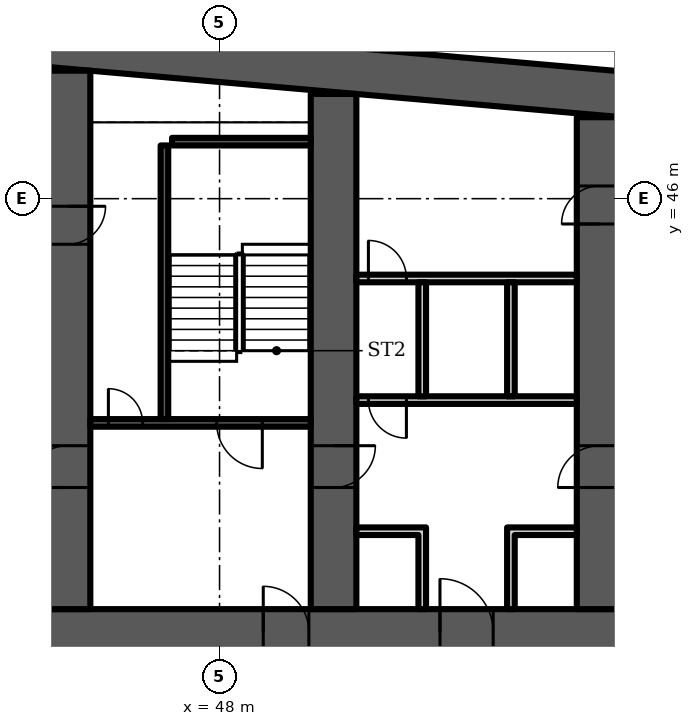
"""IFC4 building model, lengths in metres.
Left out: names, types, materials, properties, quantities, classifications, styles, units other than length and angle.
Written with IfcOpenShell. Run it as: python <this file> out.ifc"""

import sys

from ifc_helpers import new_model, si_unit, direction, frame, frame_2d, origin, place, context, subcontext, project, spatial, polyline, rectangle, outline, extrude, element, fill, save


model = new_model("IFC4")
c1 = context("Model", 3, precision=1e-05, world=origin(), true_north=direction((0.0, 1.0)))
c2 = subcontext(c1, "Body", "Model", "MODEL_VIEW")
j1 = project(units=[si_unit("LENGTHUNIT", "METRE"), si_unit("PLANEANGLEUNIT", "RADIAN")], contexts=[c1])
p1 = place(None, origin())
s1 = spatial("IfcSite", under=j1, at=p1, CompositionType="ELEMENT")
p2 = place(p1, origin())
s2 = spatial("IfcBuilding", under=s1, at=p2, CompositionType="ELEMENT")
p3 = place(p2, frame((0.0, 0.0, 73.9)))
s3 = spatial("IfcBuildingStorey", under=s2, at=p3, CompositionType="ELEMENT", Elevation=73.9)
p4 = place(p3, origin())
e1 = element("IfcWall", 1, at=p4, inside=s3, PredefinedType="SHEAR", context=c2, shape_type="SweptSolid", body=[
    extrude(outline(polyline([(9.0, 47.583), (37.0, 50.032), (65.0, 47.583), (65.0, 48.787), (37.0, 51.237), (9.0, 48.787), (9.0, 47.583)])), origin(), (0.0, 0.0, 1.0), 3.6),
])
p5 = place(p3, frame((9.0, 34.6, 0.0), z_axis=(0.0, 0.0, 1.0), x_axis=(1.0, 0.0, 0.0)))
e2 = element("IfcWall", 2, at=p5, inside=s3, PredefinedType="SHEAR", context=c2, shape_type="SweptSolid", body=[
    extrude(rectangle(XDim=56.0, YDim=1.2, at=frame_2d((28.0, 0.0))), origin(), (0.0, 0.0, 1.0), 3.6),
])
p6 = place(p5, frame((2.0, 0.0, 0.0)))
e3 = element("IfcOpeningElement", 3, at=p6, cuts=e2, PredefinedType="OPENING", context=c2, shape_type="SweptSolid", body=[
    extrude(rectangle(XDim=1.0, YDim=2.1, at=frame_2d((0.5, 1.05))), frame((0.0, 0.61, 0.0), z_axis=(0.0, -1.0, 0.0), x_axis=(1.0, 0.0, 0.0)), (0.0, 0.0, 1.0), 1.22),
])
p7 = place(p5, frame((4.6, 0.0, 0.0)))
e4 = element("IfcOpeningElement", 4, at=p7, cuts=e2, PredefinedType="OPENING", context=c2, shape_type="SweptSolid", body=[
    extrude(rectangle(XDim=1.0, YDim=2.1, at=frame_2d((0.5, 1.05))), frame((0.0, 0.61, 0.0), z_axis=(0.0, -1.0, 0.0), x_axis=(1.0, 0.0, 0.0)), (0.0, 0.0, 1.0), 1.22),
])
p8 = place(p5, frame((7.867, 0.0, 0.0)))
e5 = element("IfcOpeningElement", 5, at=p8, cuts=e2, PredefinedType="OPENING", context=c2, shape_type="SweptSolid", body=[
    extrude(rectangle(XDim=1.1, YDim=2.1, at=frame_2d((0.55, 1.05))), frame((0.0, 0.61, 0.0), z_axis=(0.0, -1.0, 0.0), x_axis=(1.0, 0.0, 0.0)), (0.0, 0.0, 1.0), 1.22),
])
p9 = place(p5, frame((12.033, 0.0, 0.0)))
e6 = element("IfcOpeningElement", 6, at=p9, cuts=e2, PredefinedType="OPENING", context=c2, shape_type="SweptSolid", body=[
    extrude(rectangle(XDim=1.1, YDim=2.1, at=frame_2d((0.55, 1.05))), frame((0.0, 0.61, 0.0), z_axis=(0.0, -1.0, 0.0), x_axis=(1.0, 0.0, 0.0)), (0.0, 0.0, 1.0), 1.22),
])
p10 = place(p5, frame((9.8, 0.0, 0.0)))
e7 = element("IfcOpeningElement", 7, at=p10, cuts=e2, PredefinedType="OPENING", context=c2, shape_type="SweptSolid", body=[
    extrude(rectangle(XDim=1.4, YDim=2.1, at=frame_2d((0.7, 1.05))), frame((0.0, 0.61, 0.0), z_axis=(0.0, -1.0, 0.0), x_axis=(1.0, 0.0, 0.0)), (0.0, 0.0, 1.0), 1.22),
])
p11 = place(p5, frame((14.65, 0.0, 0.0)))
e8 = element("IfcOpeningElement", 8, at=p11, cuts=e2, PredefinedType="OPENING", context=c2, shape_type="SweptSolid", body=[
    extrude(rectangle(XDim=1.2, YDim=2.1, at=frame_2d((0.6, 1.05))), frame((0.0, 0.61, 0.0), z_axis=(0.0, -1.0, 0.0), x_axis=(1.0, 0.0, 0.0)), (0.0, 0.0, 1.0), 1.22),
])
p12 = place(p5, frame((21.867, 0.0, 0.0)))
e9 = element("IfcOpeningElement", 9, at=p12, cuts=e2, PredefinedType="OPENING", context=c2, shape_type="SweptSolid", body=[
    extrude(rectangle(XDim=1.1, YDim=2.1, at=frame_2d((0.55, 1.05))), frame((0.0, 0.61, 0.0), z_axis=(0.0, -1.0, 0.0), x_axis=(1.0, 0.0, 0.0)), (0.0, 0.0, 1.0), 1.22),
])
p13 = place(p5, frame((26.033, 0.0, 0.0)))
e10 = element("IfcOpeningElement", 10, at=p13, cuts=e2, PredefinedType="OPENING", context=c2, shape_type="SweptSolid", body=[
    extrude(rectangle(XDim=1.1, YDim=2.1, at=frame_2d((0.55, 1.05))), frame((0.0, 0.61, 0.0), z_axis=(0.0, -1.0, 0.0), x_axis=(1.0, 0.0, 0.0)), (0.0, 0.0, 1.0), 1.22),
])
p14 = place(p5, frame((23.8, 0.0, 0.0)))
e11 = element("IfcOpeningElement", 11, at=p14, cuts=e2, PredefinedType="OPENING", context=c2, shape_type="SweptSolid", body=[
    extrude(rectangle(XDim=1.4, YDim=2.1, at=frame_2d((0.7, 1.05))), frame((0.0, 0.61, 0.0), z_axis=(0.0, -1.0, 0.0), x_axis=(1.0, 0.0, 0.0)), (0.0, 0.0, 1.0), 1.22),
])
p15 = place(p5, frame((28.867, 0.0, 0.0)))
e12 = element("IfcOpeningElement", 12, at=p15, cuts=e2, PredefinedType="OPENING", context=c2, shape_type="SweptSolid", body=[
    extrude(rectangle(XDim=1.1, YDim=2.1, at=frame_2d((0.55, 1.05))), frame((0.0, 0.61, 0.0), z_axis=(0.0, -1.0, 0.0), x_axis=(1.0, 0.0, 0.0)), (0.0, 0.0, 1.0), 1.22),
])
p16 = place(p5, frame((33.033, 0.0, 0.0)))
e13 = element("IfcOpeningElement", 13, at=p16, cuts=e2, PredefinedType="OPENING", context=c2, shape_type="SweptSolid", body=[
    extrude(rectangle(XDim=1.1, YDim=2.1, at=frame_2d((0.55, 1.05))), frame((0.0, 0.61, 0.0), z_axis=(0.0, -1.0, 0.0), x_axis=(1.0, 0.0, 0.0)), (0.0, 0.0, 1.0), 1.22),
])
p17 = place(p5, frame((40.15, 0.0, 0.0)))
e14 = element("IfcOpeningElement", 14, at=p17, cuts=e2, PredefinedType="OPENING", context=c2, shape_type="SweptSolid", body=[
    extrude(rectangle(XDim=1.2, YDim=2.1, at=frame_2d((0.6, 1.05))), frame((0.0, 0.61, 0.0), z_axis=(0.0, -1.0, 0.0), x_axis=(1.0, 0.0, 0.0)), (0.0, 0.0, 1.0), 1.22),
])
p18 = place(p5, frame((44.8, 0.0, 0.0)))
e15 = element("IfcOpeningElement", 15, at=p18, cuts=e2, PredefinedType="OPENING", context=c2, shape_type="SweptSolid", body=[
    extrude(rectangle(XDim=1.4, YDim=2.1, at=frame_2d((0.7, 1.05))), frame((0.0, 0.61, 0.0), z_axis=(0.0, -1.0, 0.0), x_axis=(1.0, 0.0, 0.0)), (0.0, 0.0, 1.0), 1.22),
])
p19 = place(p5, frame((49.867, 0.0, 0.0)))
e16 = element("IfcOpeningElement", 16, at=p19, cuts=e2, PredefinedType="OPENING", context=c2, shape_type="SweptSolid", body=[
    extrude(rectangle(XDim=1.1, YDim=2.1, at=frame_2d((0.55, 1.05))), frame((0.0, 0.61, 0.0), z_axis=(0.0, -1.0, 0.0), x_axis=(1.0, 0.0, 0.0)), (0.0, 0.0, 1.0), 1.22),
])
p20 = place(p5, frame((53.5, 0.0, 0.0)))
e17 = element("IfcOpeningElement", 17, at=p20, cuts=e2, PredefinedType="OPENING", context=c2, shape_type="SweptSolid", body=[
    extrude(rectangle(XDim=1.1, YDim=2.1, at=frame_2d((0.55, 1.05))), frame((0.0, 0.61, 0.0), z_axis=(0.0, -1.0, 0.0), x_axis=(1.0, 0.0, 0.0)), (0.0, 0.0, 1.0), 1.22),
])
p21 = place(p5, frame((51.567, 0.0, 0.0)))
e18 = element("IfcOpeningElement", 18, at=p21, cuts=e2, PredefinedType="OPENING", context=c2, shape_type="SweptSolid", body=[
    extrude(rectangle(XDim=1.4, YDim=2.1, at=frame_2d((0.7, 1.05))), frame((0.0, 0.61, 0.0), z_axis=(0.0, -1.0, 0.0), x_axis=(1.0, 0.0, 0.0)), (0.0, 0.0, 1.0), 1.22),
])
p22 = place(p3, frame((44.0, 35.2, 0.0), z_axis=(0.0, 0.0, 1.0), x_axis=(0.0, 1.0, 0.0)))
e19 = element("IfcWall", 19, at=p22, inside=s3, PredefinedType="SHEAR", context=c2, shape_type="SweptSolid", body=[
    extrude(rectangle(XDim=14.168, YDim=1.2, at=frame_2d((7.084, 0.0))), origin(), (0.0, 0.0, 1.0), 3.6),
])
p23 = place(p22, frame((3.2, 0.0, 0.0)))
e20 = element("IfcOpeningElement", 20, at=p23, cuts=e19, PredefinedType="OPENING", context=c2, shape_type="SweptSolid", body=[
    extrude(rectangle(XDim=1.1, YDim=2.1, at=frame_2d((0.55, 1.05))), frame((0.0, 0.61, 0.0), z_axis=(0.0, -1.0, 0.0), x_axis=(1.0, 0.0, 0.0)), (0.0, 0.0, 1.0), 1.22),
])
p24 = place(p22, frame((9.6, 0.0, 0.0)))
e21 = element("IfcOpeningElement", 21, at=p24, cuts=e19, PredefinedType="OPENING", context=c2, shape_type="SweptSolid", body=[
    extrude(rectangle(XDim=1.0, YDim=2.1, at=frame_2d((0.5, 1.05))), frame((0.0, 0.61, 0.0), z_axis=(0.0, -1.0, 0.0), x_axis=(1.0, 0.0, 0.0)), (0.0, 0.0, 1.0), 1.22),
])
p25 = place(p3, frame((51.0, 35.2, 0.0), z_axis=(0.0, 0.0, 1.0), x_axis=(0.0, 1.0, 0.0)))
e22 = element("IfcWall", 22, at=p25, inside=s3, PredefinedType="SHEAR", context=c2, shape_type="SweptSolid", body=[
    extrude(rectangle(XDim=13.555, YDim=1.2, at=frame_2d((6.778, 0.0))), origin(), (0.0, 0.0, 1.0), 3.6),
])
p26 = place(p25, frame((3.2, 0.0, 0.0)))
e23 = element("IfcOpeningElement", 23, at=p26, cuts=e22, PredefinedType="OPENING", context=c2, shape_type="SweptSolid", body=[
    extrude(rectangle(XDim=1.1, YDim=2.1, at=frame_2d((0.55, 1.05))), frame((0.0, 0.61, 0.0), z_axis=(0.0, -1.0, 0.0), x_axis=(1.0, 0.0, 0.0)), (0.0, 0.0, 1.0), 1.22),
])
p27 = place(p3, frame((58.0, 35.2, 0.0), z_axis=(0.0, 0.0, 1.0), x_axis=(0.0, 1.0, 0.0)))
e24 = element("IfcWall", 24, at=p27, inside=s3, PredefinedType="SHEAR", context=c2, shape_type="SweptSolid", body=[
    extrude(rectangle(XDim=12.943, YDim=1.2, at=frame_2d((6.471, 0.0))), origin(), (0.0, 0.0, 1.0), 3.6),
])
p28 = place(p27, frame((10.134, 0.0, 0.0)))
e25 = element("IfcOpeningElement", 25, at=p28, cuts=e24, PredefinedType="OPENING", context=c2, shape_type="SweptSolid", body=[
    extrude(rectangle(XDim=1.0, YDim=2.1, at=frame_2d((0.5, 1.05))), frame((0.0, 0.61, 0.0), z_axis=(0.0, -1.0, 0.0), x_axis=(1.0, 0.0, 0.0)), (0.0, 0.0, 1.0), 1.22),
])
p29 = place(p27, frame((3.2, 0.0, 0.0)))
e26 = element("IfcOpeningElement", 26, at=p29, cuts=e24, PredefinedType="OPENING", context=c2, shape_type="SweptSolid", body=[
    extrude(rectangle(XDim=1.1, YDim=2.1, at=frame_2d((0.55, 1.05))), frame((0.0, 0.61, 0.0), z_axis=(0.0, -1.0, 0.0), x_axis=(1.0, 0.0, 0.0)), (0.0, 0.0, 1.0), 1.22),
])
p30 = place(p3, frame((44.6, 40.1, 0.0), z_axis=(0.0, 0.0, 1.0), x_axis=(1.0, 0.0, 0.0)))
e27 = element("IfcWall", 27, at=p30, inside=s3, PredefinedType="SHEAR", context=c2, shape_type="SweptSolid", body=[
    extrude(rectangle(XDim=5.8, YDim=0.2, at=frame_2d((2.9, 0.0))), origin(), (0.0, 0.0, 1.0), 3.2),
])
p31 = place(p30, frame((3.325, 0.0, 0.0)))
e28 = element("IfcOpeningElement", 28, at=p31, cuts=e27, PredefinedType="OPENING", context=c2, shape_type="SweptSolid", body=[
    extrude(rectangle(XDim=1.2, YDim=2.1, at=frame_2d((0.6, 1.05))), frame((0.0, 0.11, 0.0), z_axis=(0.0, -1.0, 0.0), x_axis=(1.0, 0.0, 0.0)), (0.0, 0.0, 1.0), 0.22),
])
p32 = place(p30, frame((0.475, 0.0, 0.0)))
e29 = element("IfcOpeningElement", 29, at=p32, cuts=e27, PredefinedType="OPENING", context=c2, shape_type="SweptSolid", body=[
    extrude(rectangle(XDim=0.9, YDim=2.1, at=frame_2d((0.45, 1.05))), frame((0.0, 0.11, 0.0), z_axis=(0.0, -1.0, 0.0), x_axis=(1.0, 0.0, 0.0)), (0.0, 0.0, 1.0), 0.22),
])
p33 = place(p3, frame((46.55, 40.2, 0.0), z_axis=(0.0, 0.0, 1.0), x_axis=(0.0, 1.0, 0.0)))
e30 = element("IfcWall", 30, at=p33, inside=s3, PredefinedType="SHEAR", context=c2, shape_type="SweptSolid", body=[
    extrude(rectangle(XDim=7.2, YDim=0.2, at=frame_2d((3.6, 0.0))), origin(), (0.0, 0.0, 1.0), 3.2),
])
p34 = place(p3, frame((46.75, 47.5, 0.0), z_axis=(0.0, 0.0, 1.0), x_axis=(1.0, 0.0, 0.0)))
e31 = element("IfcWall", 31, at=p34, inside=s3, PredefinedType="SHEAR", context=c2, shape_type="SweptSolid", body=[
    extrude(rectangle(XDim=3.65, YDim=0.2, at=frame_2d((1.825, 0.0))), origin(), (0.0, 0.0, 1.0), 3.2),
])
p35 = place(p3, frame((51.6, 40.7, 0.0), z_axis=(0.0, 0.0, 1.0), x_axis=(1.0, 0.0, 0.0)))
e32 = element("IfcWall", 32, at=p35, inside=s3, PredefinedType="PARTITIONING", context=c2, shape_type="SweptSolid", body=[
    extrude(rectangle(XDim=5.8, YDim=0.2, at=frame_2d((2.9, 0.0))), origin(), (0.0, 0.0, 1.0), 3.2),
])
p36 = place(p35, frame((0.317, 0.0, 0.0)))
e33 = element("IfcOpeningElement", 33, at=p36, cuts=e32, PredefinedType="OPENING", context=c2, shape_type="SweptSolid", body=[
    extrude(rectangle(XDim=1.0, YDim=2.1, at=frame_2d((0.5, 1.05))), frame((0.0, 0.11, 0.0), z_axis=(0.0, -1.0, 0.0), x_axis=(1.0, 0.0, 0.0)), (0.0, 0.0, 1.0), 0.22),
])
p37 = place(p3, frame((51.6, 43.9, 0.0), z_axis=(0.0, 0.0, 1.0), x_axis=(1.0, 0.0, 0.0)))
e34 = element("IfcWall", 34, at=p37, inside=s3, PredefinedType="PARTITIONING", context=c2, shape_type="SweptSolid", body=[
    extrude(rectangle(XDim=5.8, YDim=0.2, at=frame_2d((2.9, 0.0))), origin(), (0.0, 0.0, 1.0), 3.2),
])
p38 = place(p37, frame((0.317, 0.0, 0.0)))
e35 = element("IfcOpeningElement", 35, at=p38, cuts=e34, PredefinedType="OPENING", context=c2, shape_type="SweptSolid", body=[
    extrude(rectangle(XDim=1.0, YDim=2.1, at=frame_2d((0.5, 1.05))), frame((0.0, 0.11, 0.0), z_axis=(0.0, -1.0, 0.0), x_axis=(1.0, 0.0, 0.0)), (0.0, 0.0, 1.0), 0.22),
])
p39 = place(p3, origin())
e36 = element("IfcWall", 36, at=p39, inside=s3, PredefinedType="PARTITIONING", context=c2, shape_type="SweptSolid", body=[
    extrude(outline(polyline([(53.233, 37.15), (51.6, 37.15), (51.6, 37.35), (53.233, 37.35), (53.433, 37.35), (53.433, 35.2), (53.233, 35.2), (53.233, 37.15)])), origin(), (0.0, 0.0, 1.0), 3.2),
])
p40 = place(p3, origin())
e37 = element("IfcWall", 37, at=p40, inside=s3, PredefinedType="PARTITIONING", context=c2, shape_type="SweptSolid", body=[
    extrude(outline(polyline([(55.567, 37.35), (55.767, 37.35), (57.4, 37.35), (57.4, 37.15), (55.767, 37.15), (55.767, 35.2), (55.567, 35.2), (55.567, 37.35)])), origin(), (0.0, 0.0, 1.0), 3.2),
])
p41 = place(p3, origin())
e38 = element("IfcWall", 38, at=p41, inside=s3, PredefinedType="PARTITIONING", context=c2, shape_type="SweptSolid", body=[
    extrude(outline(polyline([(53.233, 40.8), (53.233, 43.8), (53.433, 43.8), (53.433, 40.8), (53.233, 40.8)])), origin(), (0.0, 0.0, 1.0), 3.2),
])
p42 = place(p3, origin())
e39 = element("IfcWall", 39, at=p42, inside=s3, PredefinedType="PARTITIONING", context=c2, shape_type="SweptSolid", body=[
    extrude(outline(polyline([(55.567, 40.8), (55.567, 43.8), (55.767, 43.8), (55.767, 40.8), (55.567, 40.8)])), origin(), (0.0, 0.0, 1.0), 3.2),
])
p43 = place(p31, origin())
e40 = element("IfcDoor", 40, at=p43, inside=s3, OperationType="SINGLE_SWING_RIGHT", PredefinedType="DOOR", context=c2, shape_type="SweptSolid", body=[
    extrude(rectangle(XDim=1.2, YDim=2.1, at=frame_2d((0.6, 1.05))), frame((0.0, 0.025, 0.0), z_axis=(0.0, -1.0, 0.0), x_axis=(1.0, 0.0, 0.0)), (0.0, 0.0, 1.0), 0.05),
])
fill(e28, e40)
p44 = place(p32, origin())
e41 = element("IfcDoor", 41, at=p44, inside=s3, OperationType="SINGLE_SWING_LEFT", PredefinedType="DOOR", context=c2, shape_type="SweptSolid", body=[
    extrude(rectangle(XDim=0.9, YDim=2.1, at=frame_2d((0.45, 1.05))), frame((0.0, 0.025, 0.0), z_axis=(0.0, -1.0, 0.0), x_axis=(1.0, 0.0, 0.0)), (0.0, 0.0, 1.0), 0.05),
])
fill(e29, e41)
p45 = place(p17, origin())
e42 = element("IfcDoor", 42, at=p45, inside=s3, OperationType="SINGLE_SWING_LEFT", PredefinedType="DOOR", context=c2, shape_type="SweptSolid", body=[
    extrude(rectangle(XDim=1.2, YDim=2.1, at=frame_2d((0.6, 1.05))), frame((0.0, 0.025, 0.0), z_axis=(0.0, -1.0, 0.0), x_axis=(1.0, 0.0, 0.0)), (0.0, 0.0, 1.0), 0.05),
])
fill(e14, e42)
p46 = place(p18, origin())
e43 = element("IfcDoor", 43, at=p46, inside=s3, OperationType="DOUBLE_DOOR_SINGLE_SWING", PredefinedType="DOOR", context=c2, shape_type="SweptSolid", body=[
    extrude(rectangle(XDim=1.4, YDim=2.1, at=frame_2d((0.7, 1.05))), frame((0.0, 0.025, 0.0), z_axis=(0.0, -1.0, 0.0), x_axis=(1.0, 0.0, 0.0)), (0.0, 0.0, 1.0), 0.05),
])
fill(e15, e43)
p47 = place(p36, origin())
e44 = element("IfcDoor", 44, at=p47, inside=s3, OperationType="SINGLE_SWING_RIGHT", PredefinedType="DOOR", context=c2, shape_type="SweptSolid", body=[
    extrude(rectangle(XDim=1.0, YDim=2.1, at=frame_2d((0.5, 1.05))), frame((0.0, 0.025, 0.0), z_axis=(0.0, -1.0, 0.0), x_axis=(1.0, 0.0, 0.0)), (0.0, 0.0, 1.0), 0.05),
])
fill(e33, e44)
p48 = place(p38, origin())
e45 = element("IfcDoor", 45, at=p48, inside=s3, OperationType="SINGLE_SWING_LEFT", PredefinedType="DOOR", context=c2, shape_type="SweptSolid", body=[
    extrude(rectangle(XDim=1.0, YDim=2.1, at=frame_2d((0.5, 1.05))), frame((0.0, 0.025, 0.0), z_axis=(0.0, -1.0, 0.0), x_axis=(1.0, 0.0, 0.0)), (0.0, 0.0, 1.0), 0.05),
])
fill(e35, e45)
p49 = place(p28, origin())
e46 = element("IfcDoor", 46, at=p49, inside=s3, OperationType="SINGLE_SWING_LEFT", PredefinedType="DOOR", context=c2, shape_type="SweptSolid", body=[
    extrude(rectangle(XDim=1.0, YDim=2.1, at=frame_2d((0.5, 1.05))), frame((0.0, 0.6, 0.0), z_axis=(0.0, -1.0, 0.0), x_axis=(1.0, 0.0, 0.0)), (0.0, 0.0, 1.0), 1.199),
])
fill(e25, e46)
p50 = place(p23, origin())
e47 = element("IfcDoor", 47, at=p50, inside=s3, OperationType="SINGLE_SWING_LEFT", PredefinedType="DOOR", context=c2, shape_type="SweptSolid", body=[
    extrude(rectangle(XDim=1.1, YDim=2.1, at=frame_2d((0.55, 1.05))), frame((0.0, 0.025, 0.0), z_axis=(0.0, -1.0, 0.0), x_axis=(1.0, 0.0, 0.0)), (0.0, 0.0, 1.0), 0.05),
])
fill(e20, e47)
p51 = place(p24, origin())
e48 = element("IfcDoor", 48, at=p51, inside=s3, OperationType="SINGLE_SWING_RIGHT", PredefinedType="DOOR", context=c2, shape_type="SweptSolid", body=[
    extrude(rectangle(XDim=1.0, YDim=2.1, at=frame_2d((0.5, 1.05))), frame((0.0, 0.6, 0.0), z_axis=(0.0, -1.0, 0.0), x_axis=(1.0, 0.0, 0.0)), (0.0, 0.0, 1.0), 1.199),
])
fill(e21, e48)
p52 = place(p26, origin())
e49 = element("IfcDoor", 49, at=p52, inside=s3, OperationType="SINGLE_SWING_RIGHT", PredefinedType="DOOR", context=c2, shape_type="SweptSolid", body=[
    extrude(rectangle(XDim=1.1, YDim=2.1, at=frame_2d((0.55, 1.05))), frame((0.0, 0.025, 0.0), z_axis=(0.0, -1.0, 0.0), x_axis=(1.0, 0.0, 0.0)), (0.0, 0.0, 1.0), 0.05),
])
fill(e23, e49)
p53 = place(p29, origin())
e50 = element("IfcDoor", 50, at=p53, inside=s3, OperationType="SINGLE_SWING_LEFT", PredefinedType="DOOR", context=c2, shape_type="SweptSolid", body=[
    extrude(rectangle(XDim=1.1, YDim=2.1, at=frame_2d((0.55, 1.05))), frame((0.0, 0.025, 0.0), z_axis=(0.0, -1.0, 0.0), x_axis=(1.0, 0.0, 0.0)), (0.0, 0.0, 1.0), 0.05),
])
fill(e26, e50)
save(model, sys.argv[1])
